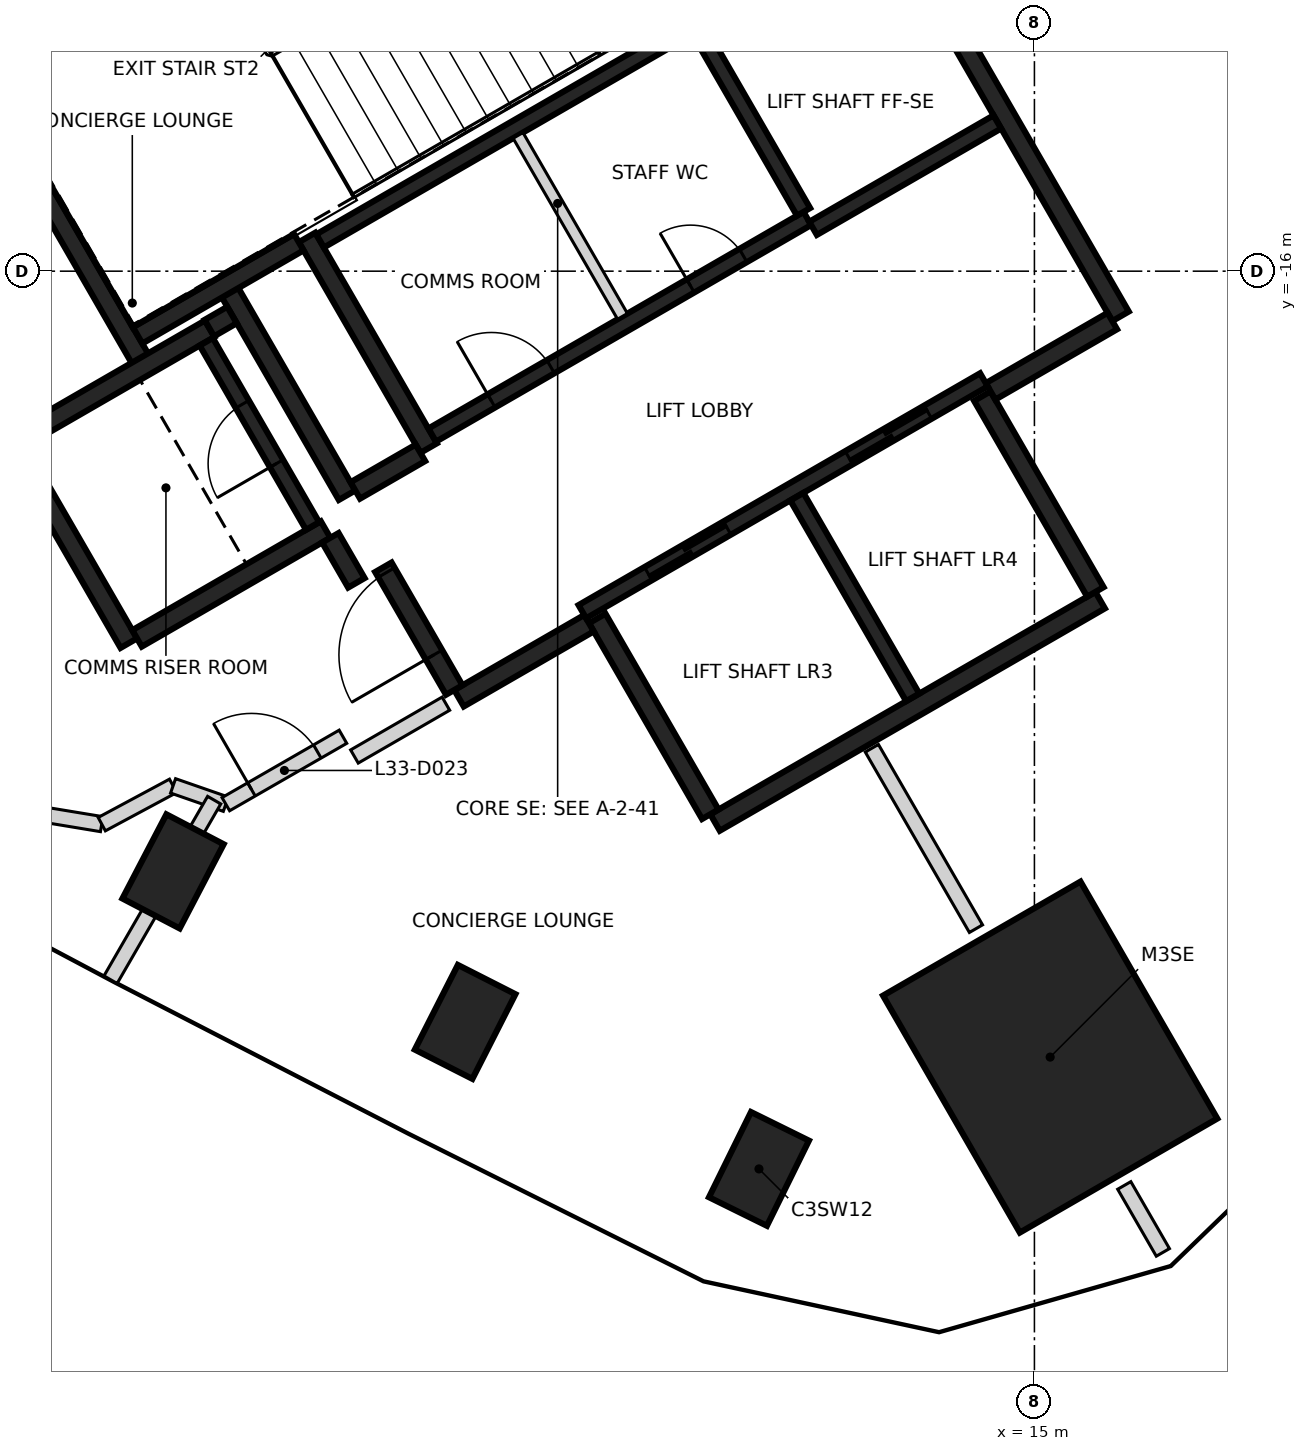
"""IFC4 building model, lengths in metres.
Left out: names, types, materials, properties, quantities, classifications, styles, units other than length and angle.
Written with IfcOpenShell. Run it as: python <this file> out.ifc"""

import sys

from ifc_helpers import new_model, si_unit, direction, frame, frame_2d, origin, origin_2d, place, context, subcontext, project, spatial, rectangle, extrude, element, fill, save


model = new_model("IFC4")
c1 = context("Model", 3, precision=1e-05, world=origin(), true_north=direction((0.0, 1.0)))
c2 = subcontext(c1, "Body", "Model", "MODEL_VIEW")
j1 = project(units=[si_unit("LENGTHUNIT", "METRE"), si_unit("PLANEANGLEUNIT", "RADIAN")], contexts=[c1])
p1 = place(None, origin())
s1 = spatial("IfcSite", under=j1, at=p1, CompositionType="ELEMENT")
p2 = place(p1, origin())
s2 = spatial("IfcBuilding", under=s1, at=p2, CompositionType="ELEMENT")
p3 = place(p2, frame((0.0, 0.0, 136.0)))
s3 = spatial("IfcBuildingStorey", under=s2, at=p3, CompositionType="ELEMENT", Elevation=136.0)
for number, where, z_axis, x_axis in (
    (1, (3.667, -23.896, -0.4), (0.0, 0.0, 1.0), (0.463, 0.886, 0.0)),
    (2, (7.51, -25.876, -0.4), (0.0, 0.0, 1.0), (0.453, 0.892, 0.0)),
    (3, (11.376, -27.811, -0.4), (0.0, 0.0, 1.0), (0.442, 0.897, 0.0)),
):
    element("IfcColumn", number, at=place(p3, frame(where, z_axis=z_axis, x_axis=x_axis)), inside=s3, PredefinedType="COLUMN", context=c2, shape_type="SweptSolid", body=[
        extrude(rectangle(XDim=1.25, YDim=0.85, at=origin_2d()), origin(), (0.0, 0.0, 1.0), 3.6),
    ])
p4 = place(p3, frame((15.207, -26.34, -0.4), z_axis=(0.0, 0.0, 1.0), x_axis=(-0.5, 0.866025403784, 0.0)))
e4 = element("IfcColumn", 4, at=p4, inside=s3, PredefinedType="COLUMN", context=c2, shape_type="SweptSolid", body=[
    extrude(rectangle(XDim=3.6, YDim=3.0, at=origin_2d()), origin(), (0.0, 0.0, 1.0), 3.6),
])
p5 = place(p3, frame((13.008, -11.181, 0.0), z_axis=(0.0, 0.0, 1.0), x_axis=(0.500004234368, -0.866022959057, 0.0)))
e5 = element("IfcWall", 5, at=p5, inside=s3, PredefinedType="SHEAR", context=c2, shape_type="SweptSolid", body=[
    extrude(rectangle(XDim=6.25, YDim=0.25, at=frame_2d((3.125, 0.0))), origin(), (0.0, 0.0, 1.0), 3.2),
])
p6 = place(p3, frame((15.865, -20.328, 0.0), z_axis=(0.0, 0.0, 1.0), x_axis=(-0.86602852612, -0.499994591916, 0.0)))
e6 = element("IfcWall", 6, at=p6, inside=s3, PredefinedType="SHEAR", context=c2, shape_type="SweptSolid", body=[
    extrude(rectangle(XDim=5.85, YDim=0.25, at=frame_2d((2.925, 0.0))), origin(), (0.0, 0.0, 1.0), 3.2),
])
p7 = place(p3, frame((3.235, -17.153, 0.0), z_axis=(0.0, 0.0, 1.0), x_axis=(-0.500008851346, 0.866020293397, 0.0)))
e7 = element("IfcWall", 7, at=p7, inside=s3, PredefinedType="SHEAR", context=c2, shape_type="SweptSolid", body=[
    extrude(rectangle(XDim=5.51, YDim=0.25, at=frame_2d((2.755, 0.0))), origin(), (0.0, 0.0, 1.0), 3.2),
])
p8 = place(p3, frame((7.031, -18.327, 0.0), z_axis=(0.0, 0.0, 1.0), x_axis=(-0.499971222258, 0.866042017984, 0.0)))
e8 = element("IfcWall", 8, at=p8, inside=s3, PredefinedType="SHEAR", context=c2, shape_type="SweptSolid", body=[
    extrude(rectangle(XDim=3.2, YDim=0.25, at=frame_2d((1.6, 0.0))), origin(), (0.0, 0.0, 1.0), 3.2),
])
for number, where, z_axis, x_axis in (
    (9, (14.315, -17.644, 0.0), (0.0, 0.0, 1.0), (0.5, -0.866, 0.0)),
    (10, (10.736, -23.145, 0.0), (0.0, 0.0, 1.0), (-0.5, 0.866, 0.0)),
):
    element("IfcWall", number, at=place(p3, frame(where, z_axis=z_axis, x_axis=x_axis)), inside=s3, PredefinedType="SHEAR", context=c2, shape_type="SweptSolid", body=[
        extrude(rectangle(XDim=2.974, YDim=0.25, at=frame_2d((1.487, 0.0))), origin(), (0.0, 0.0, 1.0), 3.2),
    ])
p9 = place(p3, frame((3.085, -20.894, 0.0), z_axis=(0.0, 0.0, 1.0), x_axis=(-0.499978833458, 0.866037623948, 0.0)))
e11 = element("IfcWall", 11, at=p9, inside=s3, PredefinedType="SHEAR", context=c2, shape_type="SweptSolid", body=[
    extrude(rectangle(XDim=3.05, YDim=0.25, at=frame_2d((1.525, 0.0))), origin(), (0.0, 0.0, 1.0), 3.2),
])
p10 = place(p3, frame((1.669, -18.19, 0.0), z_axis=(0.0, 0.0, 1.0), x_axis=(0.866042235819, 0.499970844928, 0.0)))
e12 = element("IfcWall", 12, at=p10, inside=s3, PredefinedType="SHEAR", context=c2, shape_type="SweptSolid", body=[
    extrude(rectangle(XDim=2.865, YDim=0.25, at=frame_2d((1.432, 0.0))), origin(), (0.0, 0.0, 1.0), 3.2),
])
p11 = place(p3, frame((5.675, -19.399, 0.0), z_axis=(0.0, 0.0, 1.0), x_axis=(-0.866026637627, -0.499997862916, 0.0)))
e13 = element("IfcWall", 13, at=p11, inside=s3, PredefinedType="SHEAR", context=c2, shape_type="SweptSolid", body=[
    extrude(rectangle(XDim=2.865, YDim=0.25, at=frame_2d((1.432, 0.0))), origin(), (0.0, 0.0, 1.0), 3.2),
])
p12 = place(p3, frame((4.414, -16.276, 0.0), z_axis=(0.0, 0.0, 1.0), x_axis=(0.500003324108, -0.866023484601, 0.0)))
e14 = element("IfcWall", 14, at=p12, inside=s3, PredefinedType="SHEAR", context=c2, shape_type="SweptSolid", body=[
    extrude(rectangle(XDim=3.085, YDim=0.25, at=frame_2d((1.542, 0.0))), origin(), (0.0, 0.0, 1.0), 3.2),
])
p13 = place(p3, frame((5.322, -15.619, 0.0), z_axis=(0.0, 0.0, 1.0), x_axis=(-0.866026229868, -0.499998569178, 0.0)))
e15 = element("IfcWall", 15, at=p13, inside=s3, PredefinedType="SHEAR", context=c2, shape_type="SweptSolid", body=[
    extrude(rectangle(XDim=2.449, YDim=0.25, at=frame_2d((1.225, 0.0))), origin(), (0.0, 0.0, 1.0), 3.2),
])
p14 = place(p3, frame((9.14, -20.631, 0.0), z_axis=(0.0, 0.0, 1.0), x_axis=(-0.866043531843, -0.499968599967, 0.0)))
e16 = element("IfcWall", 16, at=p14, inside=s3, PredefinedType="SHEAR", context=c2, shape_type="SweptSolid", body=[
    extrude(rectangle(XDim=1.975, YDim=0.25, at=frame_2d((0.987, 0.0))), origin(), (0.0, 0.0, 1.0), 3.2),
])
p15 = place(p3, frame((16.025, -16.656, 0.0), z_axis=(0.0, 0.0, 1.0), x_axis=(-0.866016279763, -0.500015802937, 0.0)))
e17 = element("IfcWall", 17, at=p15, inside=s3, PredefinedType="SHEAR", context=c2, shape_type="SweptSolid", body=[
    extrude(rectangle(XDim=1.849, YDim=0.25, at=frame_2d((0.925, 0.0))), origin(), (0.0, 0.0, 1.0), 3.2),
])
p16 = place(p3, frame((7.367, -21.51, 0.0), z_axis=(0.0, 0.0, 1.0), x_axis=(-0.499983108224, 0.866035156036, 0.0)))
e18 = element("IfcWall", 18, at=p16, inside=s3, PredefinedType="SHEAR", context=c2, shape_type="SweptSolid", body=[
    extrude(rectangle(XDim=1.865, YDim=0.25, at=frame_2d((0.932, 0.0))), origin(), (0.0, 0.0, 1.0), 3.2),
])
p17 = place(p16, frame((0.535, 0.0, 0.0)))
e19 = element("IfcOpeningElement", 19, at=p17, cuts=e18, PredefinedType="OPENING", context=c2, shape_type="SweptSolid", body=[
    extrude(rectangle(XDim=1.25, YDim=2.1, at=frame_2d((0.625, 1.05))), frame((0.0, 0.135, 0.0), z_axis=(0.0, -1.0, 0.0), x_axis=(1.0, 0.0, 0.0)), (0.0, 0.0, 1.0), 0.27),
])
p18 = place(p3, frame((6.065, -18.885, 0.0), z_axis=(0.0, 0.0, 1.0), x_axis=(0.866017078145, 0.500014420154, 0.0)))
e20 = element("IfcWall", 20, at=p18, inside=s3, PredefinedType="SHEAR", context=c2, shape_type="SweptSolid", body=[
    extrude(rectangle(XDim=0.989, YDim=0.25, at=frame_2d((0.495, 0.0))), origin(), (0.0, 0.0, 1.0), 3.2),
])
p19 = place(p3, frame((6.08, -20.1, 0.0), z_axis=(0.0, 0.0, 1.0), x_axis=(-0.500051773299, 0.865995510393, 0.0)))
e21 = element("IfcWall", 21, at=p19, inside=s3, PredefinedType="SHEAR", context=c2, shape_type="SweptSolid", body=[
    extrude(rectangle(XDim=0.685, YDim=0.25, at=frame_2d((0.342, 0.0))), origin(), (0.0, 0.0, 1.0), 3.2),
])
p20 = place(p3, frame((4.145, -16.749, 0.0), z_axis=(0.0, 0.0, 1.0), x_axis=(0.866185586049, 0.49972245349, 0.0)))
e22 = element("IfcWall", 22, at=p20, inside=s3, PredefinedType="SHEAR", context=c2, shape_type="SweptSolid", body=[
    extrude(rectangle(XDim=0.344, YDim=0.25, at=frame_2d((0.172, 0.0))), origin(), (0.0, 0.0, 1.0), 3.2),
])
p21 = place(p3, frame((9.052, -20.48, 0.0), z_axis=(0.0, 0.0, 1.0), x_axis=(0.866030299012, 0.499991521122, 0.0)))
e23 = element("IfcWall", 23, at=p21, inside=s3, PredefinedType="SHEAR", context=c2, shape_type="SweptSolid", body=[
    extrude(rectangle(XDim=6.1, YDim=0.2, at=frame_2d((3.05, 0.0))), origin(), (0.0, 0.0, 1.0), 3.2),
])
p22 = place(p21, frame((1.0, 0.0, 0.0)))
e24 = element("IfcOpeningElement", 24, at=p22, cuts=e23, PredefinedType="OPENING", context=c2, shape_type="SweptSolid", body=[
    extrude(rectangle(XDim=1.2, YDim=2.1, at=frame_2d((0.6, 1.05))), frame((0.0, 0.11, 0.0), z_axis=(0.0, -1.0, 0.0), x_axis=(1.0, 0.0, 0.0)), (0.0, 0.0, 1.0), 0.22),
])
p23 = place(p21, frame((4.05, 0.0, 0.0)))
e25 = element("IfcOpeningElement", 25, at=p23, cuts=e23, PredefinedType="OPENING", context=c2, shape_type="SweptSolid", body=[
    extrude(rectangle(XDim=1.2, YDim=2.1, at=frame_2d((0.6, 1.05))), frame((0.0, 0.11, 0.0), z_axis=(0.0, -1.0, 0.0), x_axis=(1.0, 0.0, 0.0)), (0.0, 0.0, 1.0), 0.22),
])
p24 = place(p3, frame((10.538, -12.752, 0.0), z_axis=(0.0, 0.0, 1.0), x_axis=(-0.866038630372, -0.499977090179, 0.0)))
e26 = element("IfcWall", 26, at=p24, inside=s3, PredefinedType="SHEAR", context=c2, shape_type="SweptSolid", body=[
    extrude(rectangle(XDim=5.699, YDim=0.2, at=frame_2d((2.85, 0.0))), origin(), (0.0, 0.0, 1.0), 3.2),
])
p25 = place(p3, frame((7.077, -18.156, 0.0), z_axis=(0.0, 0.0, 1.0), x_axis=(0.866038630372, 0.499977090179, 0.0)))
e27 = element("IfcWall", 27, at=p25, inside=s3, PredefinedType="SHEAR", context=c2, shape_type="SweptSolid", body=[
    extrude(rectangle(XDim=5.699, YDim=0.2, at=frame_2d((2.85, 0.0))), origin(), (0.0, 0.0, 1.0), 3.2),
])
p26 = place(p25, frame((0.899, 0.0, 0.0)))
e28 = element("IfcOpeningElement", 28, at=p26, cuts=e27, PredefinedType="OPENING", context=c2, shape_type="SweptSolid", body=[
    extrude(rectangle(XDim=0.9, YDim=2.1, at=frame_2d((0.45, 1.05))), frame((0.0, 0.11, 0.0), z_axis=(0.0, -1.0, 0.0), x_axis=(1.0, 0.0, 0.0)), (0.0, 0.0, 1.0), 0.22),
])
p27 = place(p25, frame((3.924, 0.0, 0.0)))
e29 = element("IfcOpeningElement", 29, at=p27, cuts=e27, PredefinedType="OPENING", context=c2, shape_type="SweptSolid", body=[
    extrude(rectangle(XDim=0.8, YDim=2.1, at=frame_2d((0.4, 1.05))), frame((0.0, 0.11, 0.0), z_axis=(0.0, -1.0, 0.0), x_axis=(1.0, 0.0, 0.0)), (0.0, 0.0, 1.0), 0.22),
])
p28 = place(p3, frame((11.875, -18.967, 0.0), z_axis=(0.0, 0.0, 1.0), x_axis=(0.49998131003, -0.866036194175, 0.0)))
e30 = element("IfcWall", 30, at=p28, inside=s3, PredefinedType="SHEAR", context=c2, shape_type="SweptSolid", body=[
    extrude(rectangle(XDim=3.048, YDim=0.2, at=frame_2d((1.524, 0.0))), origin(), (0.0, 0.0, 1.0), 3.2),
])
p29 = place(p3, frame((5.503, -19.352, 0.0), z_axis=(0.0, 0.0, 1.0), x_axis=(-0.499986818241, 0.866033014143, 0.0)))
e31 = element("IfcWall", 31, at=p29, inside=s3, PredefinedType="SHEAR", context=c2, shape_type="SweptSolid", body=[
    extrude(rectangle(XDim=2.798, YDim=0.2, at=frame_2d((1.399, 0.0))), origin(), (0.0, 0.0, 1.0), 3.2),
])
p30 = place(p29, frame((0.949, 0.0, 0.0)))
e32 = element("IfcOpeningElement", 32, at=p30, cuts=e31, PredefinedType="OPENING", context=c2, shape_type="SweptSolid", body=[
    extrude(rectangle(XDim=0.9, YDim=2.1, at=frame_2d((0.45, 1.05))), frame((0.0, 0.11, 0.0), z_axis=(0.0, -1.0, 0.0), x_axis=(1.0, 0.0, 0.0)), (0.0, 0.0, 1.0), 0.22),
])
p31 = place(p3, frame((11.963, -15.22, 0.0), z_axis=(0.0, 0.0, 1.0), x_axis=(-0.500034990121, 0.866005201286, 0.0)))
e33 = element("IfcWall", 33, at=p31, inside=s3, PredefinedType="SHEAR", context=c2, shape_type="SweptSolid", body=[
    extrude(rectangle(XDim=2.75, YDim=0.2, at=frame_2d((1.375, 0.0))), origin(), (0.0, 0.0, 1.0), 3.2),
])
p32 = place(p3, frame((14.512, -14.037, 0.0), z_axis=(0.0, 0.0, 1.0), x_axis=(-0.866044696403, -0.499966582715, 0.0)))
e34 = element("IfcWall", 34, at=p32, inside=s3, PredefinedType="SHEAR", context=c2, shape_type="SweptSolid", body=[
    extrude(rectangle(XDim=2.799, YDim=0.2, at=frame_2d((1.399, 0.0))), origin(), (0.0, 0.0, 1.0), 3.2),
])
p33 = place(p3, frame((8.207, -14.214, 0.0), z_axis=(0.0, 0.0, 1.0), x_axis=(0.50002746344, -0.86600954718, 0.0)))
e35 = element("IfcWall", 35, at=p33, inside=s3, PredefinedType="PARTITIONING", context=c2, shape_type="SweptSolid", body=[
    extrude(rectangle(XDim=2.748, YDim=0.15, at=frame_2d((1.374, 0.0))), origin(), (0.0, 0.0, 1.0), 3.2),
])
p34 = place(p3, frame((1.584, -23.086, 0.0), z_axis=(0.0, 0.0, 1.0), x_axis=(0.986654221629, -0.162829502674, 0.0)))
e36 = element("IfcWall", 36, at=p34, inside=s3, PredefinedType="PARTITIONING", context=c2, shape_type="SweptSolid", body=[
    extrude(rectangle(XDim=1.16, YDim=0.2, at=frame_2d((0.58, 0.0))), origin(), (0.0, 0.0, 1.0), 2.3),
])
p35 = place(p3, frame((2.73, -23.275, 0.0), z_axis=(0.0, 0.0, 1.0), x_axis=(0.880927165636, 0.473251866182, 0.0)))
e37 = element("IfcWall", 37, at=p35, inside=s3, PredefinedType="PARTITIONING", context=c2, shape_type="SweptSolid", body=[
    extrude(rectangle(XDim=1.065, YDim=0.2, at=frame_2d((0.532, 0.0))), origin(), (0.0, 0.0, 1.0), 3.2),
])
p36 = place(p3, frame((3.668, -22.771, 0.0), z_axis=(0.0, 0.0, 1.0), x_axis=(0.944447470761, -0.328662402738, 0.0)))
e38 = element("IfcWall", 38, at=p36, inside=s3, PredefinedType="PARTITIONING", context=c2, shape_type="SweptSolid", body=[
    extrude(rectangle(XDim=0.735, YDim=0.2, at=frame_2d((0.367, 0.0))), origin(), (0.0, 0.0, 1.0), 3.2),
])
p37 = place(p3, frame((4.362, -23.012, 0.0), z_axis=(0.0, 0.0, 1.0), x_axis=(0.866692617793, 0.49884256661, 0.0)))
e39 = element("IfcWall", 39, at=p37, inside=s3, PredefinedType="PARTITIONING", context=c2, shape_type="SweptSolid", body=[
    extrude(rectangle(XDim=1.778, YDim=0.2, at=frame_2d((0.889, 0.0))), origin(), (0.0, 0.0, 1.0), 3.2),
])
p38 = place(p37, frame((0.389, 0.0, 0.0)))
e40 = element("IfcOpeningElement", 40, at=p38, cuts=e39, PredefinedType="OPENING", context=c2, shape_type="SweptSolid", body=[
    extrude(rectangle(XDim=1.0, YDim=2.1, at=frame_2d((0.5, 1.05))), frame((0.0, 0.11, 0.0), z_axis=(0.0, -1.0, 0.0), x_axis=(1.0, 0.0, 0.0)), (0.0, 0.0, 1.0), 0.22),
])
p39 = place(p3, frame((6.054, -22.385, 0.0), z_axis=(0.0, 0.0, 1.0), x_axis=(0.86593101922, 0.500163443238, 0.0)))
e41 = element("IfcWall", 41, at=p39, inside=s3, PredefinedType="PARTITIONING", context=c2, shape_type="SweptSolid", body=[
    extrude(rectangle(XDim=1.39, YDim=0.2, at=frame_2d((0.695, 0.0))), origin(), (0.0, 0.0, 1.0), 3.2),
])
p40 = place(p3, frame((2.845, -25.321, 0.0), z_axis=(0.0, 0.0, 1.0), x_axis=(0.499942002849, 0.866058885866, 0.0)))
e42 = element("IfcWall", 42, at=p40, inside=s3, PredefinedType="PARTITIONING", context=c2, shape_type="SweptSolid", body=[
    extrude(rectangle(XDim=2.727, YDim=0.2, at=frame_2d((1.364, 0.0))), origin(), (0.0, 0.0, 1.0), 3.2),
])
p41 = place(p3, frame((12.861, -22.276, 0.0), z_axis=(0.0, 0.0, 1.0), x_axis=(0.49982784299, -0.866124775868, 0.0)))
e43 = element("IfcWall", 43, at=p41, inside=s3, PredefinedType="PARTITIONING", context=c2, shape_type="SweptSolid", body=[
    extrude(rectangle(XDim=2.741, YDim=0.2, at=frame_2d((1.37, 0.0))), origin(), (0.0, 0.0, 1.0), 3.2),
])
p42 = place(p3, frame((16.182, -28.028, 0.0), z_axis=(0.0, 0.0, 1.0), x_axis=(0.499625455419, -0.866241539236, 0.0)))
e44 = element("IfcWall", 44, at=p42, inside=s3, PredefinedType="PARTITIONING", context=c2, shape_type="SweptSolid", body=[
    extrude(rectangle(XDim=1.017, YDim=0.2, at=frame_2d((0.508, 0.0))), origin(), (0.0, 0.0, 1.0), 3.2),
])
p43 = place(p22, origin())
e45 = element("IfcDoor", 45, at=p43, inside=s3, OperationType="DOUBLE_DOOR_SLIDING", PredefinedType="DOOR", context=c2, shape_type="SweptSolid", body=[
    extrude(rectangle(XDim=1.2, YDim=2.1, at=frame_2d((0.6, 1.05))), frame((0.0, 0.025, 0.0), z_axis=(0.0, -1.0, 0.0), x_axis=(1.0, 0.0, 0.0)), (0.0, 0.0, 1.0), 0.05),
])
fill(e24, e45)
p44 = place(p23, origin())
e46 = element("IfcDoor", 46, at=p44, inside=s3, OperationType="DOUBLE_DOOR_SLIDING", PredefinedType="DOOR", context=c2, shape_type="SweptSolid", body=[
    extrude(rectangle(XDim=1.2, YDim=2.1, at=frame_2d((0.6, 1.05))), frame((0.0, 0.025, 0.0), z_axis=(0.0, -1.0, 0.0), x_axis=(1.0, 0.0, 0.0)), (0.0, 0.0, 1.0), 0.05),
])
fill(e25, e46)
p45 = place(p17, origin())
e47 = element("IfcDoor", 47, at=p45, inside=s3, OperationType="SINGLE_SWING_LEFT", PredefinedType="DOOR", context=c2, shape_type="SweptSolid", body=[
    extrude(rectangle(XDim=1.25, YDim=2.1, at=frame_2d((0.625, 1.05))), frame((0.0, 0.025, 0.0), z_axis=(0.0, -1.0, 0.0), x_axis=(1.0, 0.0, 0.0)), (0.0, 0.0, 1.0), 0.05),
])
fill(e19, e47)
p46 = place(p26, origin())
e48 = element("IfcDoor", 48, at=p46, inside=s3, OperationType="SINGLE_SWING_LEFT", PredefinedType="DOOR", context=c2, shape_type="SweptSolid", body=[
    extrude(rectangle(XDim=0.9, YDim=2.1, at=frame_2d((0.45, 1.05))), frame((0.0, 0.025, 0.0), z_axis=(0.0, -1.0, 0.0), x_axis=(1.0, 0.0, 0.0)), (0.0, 0.0, 1.0), 0.05),
])
fill(e28, e48)
p47 = place(p27, origin())
e49 = element("IfcDoor", 49, at=p47, inside=s3, OperationType="SINGLE_SWING_RIGHT", PredefinedType="DOOR", context=c2, shape_type="SweptSolid", body=[
    extrude(rectangle(XDim=0.8, YDim=2.1, at=frame_2d((0.4, 1.05))), frame((0.0, 0.025, 0.0), z_axis=(0.0, -1.0, 0.0), x_axis=(1.0, 0.0, 0.0)), (0.0, 0.0, 1.0), 0.05),
])
fill(e29, e49)
p48 = place(p30, origin())
e50 = element("IfcDoor", 50, at=p48, inside=s3, OperationType="SINGLE_SWING_LEFT", PredefinedType="DOOR", context=c2, shape_type="SweptSolid", body=[
    extrude(rectangle(XDim=0.9, YDim=2.1, at=frame_2d((0.45, 1.05))), frame((0.0, 0.025, 0.0), z_axis=(0.0, -1.0, 0.0), x_axis=(1.0, 0.0, 0.0)), (0.0, 0.0, 1.0), 0.05),
])
fill(e32, e50)
p49 = place(p38, frame((1.0, 0.0, 0.0), z_axis=(0.0, 0.0, 1.0), x_axis=(-1.0, 0.0, 0.0)))
e51 = element("IfcDoor", 51, at=p49, inside=s3, OperationType="SINGLE_SWING_LEFT", PredefinedType="DOOR", context=c2, shape_type="SweptSolid", body=[
    extrude(rectangle(XDim=1.0, YDim=2.1, at=frame_2d((0.5, 1.05))), frame((0.0, 0.025, 0.0), z_axis=(0.0, -1.0, 0.0), x_axis=(1.0, 0.0, 0.0)), (0.0, 0.0, 1.0), 0.05),
])
fill(e40, e51)
save(model, sys.argv[1])
